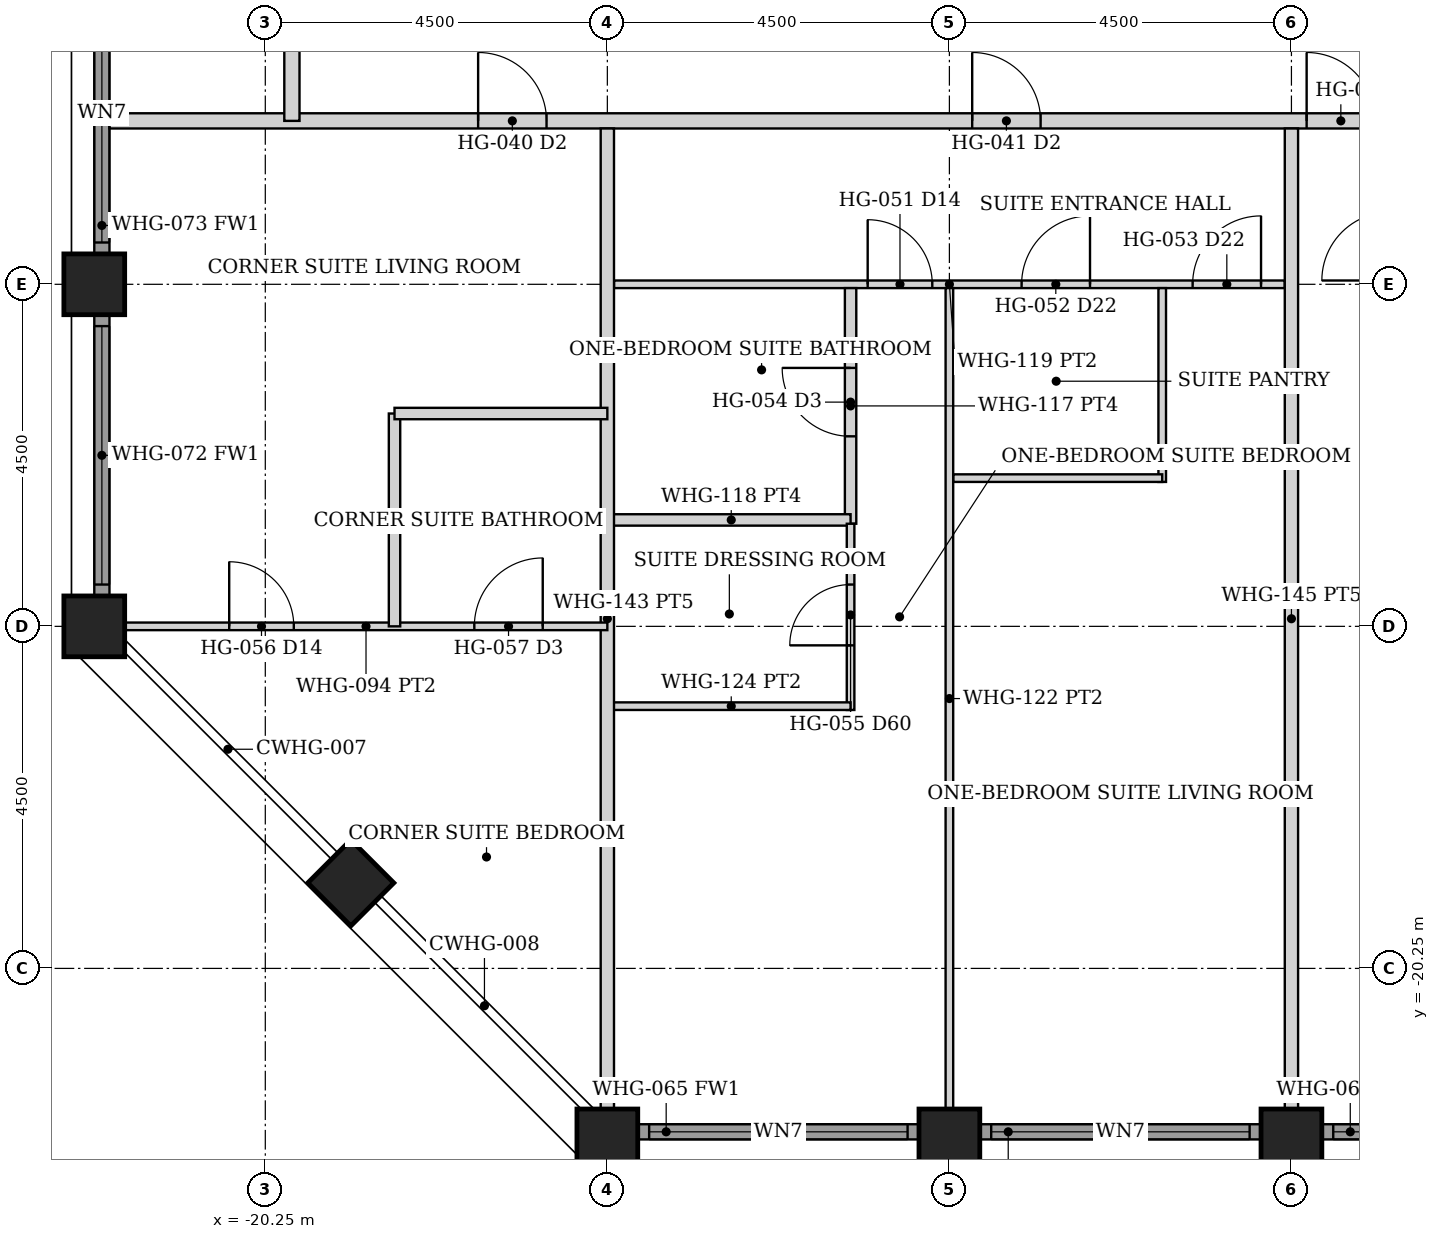
"""IFC4 building model, lengths in metres.
Left out: names, types, materials, properties, quantities, classifications, styles, units other than length and angle.
Written with IfcOpenShell. Run it as: python <this file> out.ifc"""

import sys

from ifc_helpers import new_model, si_unit, direction, frame, frame_2d, origin, origin_2d, place, context, subcontext, project, spatial, rectangle, hollow_rectangle, extrude, element, fill, save


model = new_model("IFC4")
c1 = context("Model", 3, precision=1e-05, world=origin(), true_north=direction((0.0, 1.0)))
c2 = subcontext(c1, "Body", "Model", "MODEL_VIEW")
j1 = project(units=[si_unit("LENGTHUNIT", "METRE"), si_unit("PLANEANGLEUNIT", "RADIAN")], contexts=[c1])
p1 = place(None, origin())
s1 = spatial("IfcSite", under=j1, at=p1, CompositionType="ELEMENT")
p2 = place(p1, origin())
s2 = spatial("IfcBuilding", under=s1, at=p2, CompositionType="ELEMENT")
p3 = place(p2, frame((0.0, 0.0, 186.8)))
s3 = spatial("IfcBuildingStorey", under=s2, at=p3, CompositionType="ELEMENT", Elevation=186.8)
for number, where, z_axis, x_axis in (
    (1, (-15.75, -22.5, 0.0), (0.0, 0.0, 1.0), (0.0, 1.0, 0.0)),
    (2, (-22.5, -15.75, 0.0), (0.0, 0.0, 1.0), (1.0, 0.0, 0.0)),
    (3, (-11.25, -22.5, 0.0), (0.0, 0.0, 1.0), (0.0, 1.0, 0.0)),
    (4, (-22.5, -11.25, 0.0), (0.0, 0.0, 1.0), (1.0, 0.0, 0.0)),
    (5, (-6.75, -22.5, 0.0), (0.0, 0.0, 1.0), (0.0, 1.0, 0.0)),
    (6, (-19.125, -19.125, 0.0), (0.0, 0.0, 1.0), (0.707, 0.707, 0.0)),
):
    element("IfcColumn", number, at=place(p3, frame(where, z_axis=z_axis, x_axis=x_axis)), inside=s3, PredefinedType="COLUMN", context=c2, shape_type="SweptSolid", body=[
        extrude(hollow_rectangle(XDim=0.8, YDim=0.8, WallThickness=0.045, at=origin_2d()), origin(), (0.0, 0.0, 1.0), 3.6),
    ])
p4 = place(p3, frame((-15.345, -22.4, 0.0), z_axis=(0.0, 0.0, 1.0), x_axis=(1.0, 0.0, 0.0)))
e7 = element("IfcWall", 7, at=p4, inside=s3, PredefinedType="SOLIDWALL", context=c2, shape_type="SweptSolid", body=[
    extrude(rectangle(XDim=3.69, YDim=0.2, at=frame_2d((1.845, 0.0))), origin(), (0.0, 0.0, 1.0), 2.379),
])
p5 = place(p4, frame((0.145, 0.0, 0.3)))
e8 = element("IfcOpeningElement", 8, at=p5, cuts=e7, PredefinedType="OPENING", context=c2, shape_type="SweptSolid", body=[
    extrude(rectangle(XDim=3.4, YDim=1.929, at=frame_2d((1.7, 0.964))), frame((0.0, 0.11, 0.0), z_axis=(0.0, -1.0, 0.0), x_axis=(1.0, 0.0, 0.0)), (0.0, 0.0, 1.0), 0.22),
])
p6 = place(p3, frame((-10.845, -22.4, 0.0), z_axis=(0.0, 0.0, 1.0), x_axis=(1.0, 0.0, 0.0)))
e9 = element("IfcWall", 9, at=p6, inside=s3, PredefinedType="SOLIDWALL", context=c2, shape_type="SweptSolid", body=[
    extrude(rectangle(XDim=3.69, YDim=0.2, at=frame_2d((1.845, 0.0))), origin(), (0.0, 0.0, 1.0), 2.379),
])
p7 = place(p6, frame((0.145, 0.0, 0.3)))
e10 = element("IfcOpeningElement", 10, at=p7, cuts=e9, PredefinedType="OPENING", context=c2, shape_type="SweptSolid", body=[
    extrude(rectangle(XDim=3.4, YDim=1.929, at=frame_2d((1.7, 0.964))), frame((0.0, 0.11, 0.0), z_axis=(0.0, -1.0, 0.0), x_axis=(1.0, 0.0, 0.0)), (0.0, 0.0, 1.0), 0.22),
])
p8 = place(p3, frame((-6.345, -22.4, 0.0), z_axis=(0.0, 0.0, 1.0), x_axis=(1.0, 0.0, 0.0)))
e11 = element("IfcWall", 11, at=p8, inside=s3, PredefinedType="SOLIDWALL", context=c2, shape_type="SweptSolid", body=[
    extrude(rectangle(XDim=3.69, YDim=0.2, at=frame_2d((1.845, 0.0))), origin(), (0.0, 0.0, 1.0), 2.379),
])
p9 = place(p8, frame((0.145, 0.0, 0.3)))
e12 = element("IfcOpeningElement", 12, at=p9, cuts=e11, PredefinedType="OPENING", context=c2, shape_type="SweptSolid", body=[
    extrude(rectangle(XDim=3.4, YDim=1.929, at=frame_2d((1.7, 0.964))), frame((0.0, 0.11, 0.0), z_axis=(0.0, -1.0, 0.0), x_axis=(1.0, 0.0, 0.0)), (0.0, 0.0, 1.0), 0.22),
])
p10 = place(p3, frame((-22.4, -15.345, 0.0), z_axis=(0.0, 0.0, 1.0), x_axis=(0.0, 1.0, 0.0)))
e13 = element("IfcWall", 13, at=p10, inside=s3, PredefinedType="SOLIDWALL", context=c2, shape_type="SweptSolid", body=[
    extrude(rectangle(XDim=3.69, YDim=0.2, at=frame_2d((1.845, 0.0))), origin(), (0.0, 0.0, 1.0), 2.379),
])
p11 = place(p10, frame((0.145, 0.0, 0.3)))
e14 = element("IfcOpeningElement", 14, at=p11, cuts=e13, PredefinedType="OPENING", context=c2, shape_type="SweptSolid", body=[
    extrude(rectangle(XDim=3.4, YDim=1.929, at=frame_2d((1.7, 0.964))), frame((0.0, 0.11, 0.0), z_axis=(0.0, -1.0, 0.0), x_axis=(1.0, 0.0, 0.0)), (0.0, 0.0, 1.0), 0.22),
])
p12 = place(p3, frame((-22.4, -10.845, 0.0), z_axis=(0.0, 0.0, 1.0), x_axis=(0.0, 1.0, 0.0)))
e15 = element("IfcWall", 15, at=p12, inside=s3, PredefinedType="SOLIDWALL", context=c2, shape_type="SweptSolid", body=[
    extrude(rectangle(XDim=3.69, YDim=0.2, at=frame_2d((1.845, 0.0))), origin(), (0.0, 0.0, 1.0), 2.379),
])
p13 = place(p12, frame((0.145, 0.0, 0.3)))
e16 = element("IfcOpeningElement", 16, at=p13, cuts=e15, PredefinedType="OPENING", context=c2, shape_type="SweptSolid", body=[
    extrude(rectangle(XDim=3.4, YDim=1.929, at=frame_2d((1.7, 0.964))), frame((0.0, 0.11, 0.0), z_axis=(0.0, -1.0, 0.0), x_axis=(1.0, 0.0, 0.0)), (0.0, 0.0, 1.0), 0.22),
])
p14 = place(p3, frame((-22.3, -9.1, 0.0), z_axis=(0.0, 0.0, 1.0), x_axis=(1.0, 0.0, 0.0)))
e17 = element("IfcWall", 17, at=p14, inside=s3, PredefinedType="PARTITIONING", context=c2, shape_type="SweptSolid", body=[
    extrude(rectangle(XDim=44.6, YDim=0.2, at=frame_2d((22.3, 0.0))), origin(), (0.0, 0.0, 1.0), 2.379),
])
p15 = place(p14, frame((11.35, 0.0, 0.0)))
e18 = element("IfcOpeningElement", 18, at=p15, cuts=e17, PredefinedType="OPENING", context=c2, shape_type="SweptSolid", body=[
    extrude(rectangle(XDim=0.9, YDim=2.1, at=frame_2d((0.45, 1.05))), frame((0.0, 0.11, 0.0), z_axis=(0.0, -1.0, 0.0), x_axis=(1.0, 0.0, 0.0)), (0.0, 0.0, 1.0), 0.22),
])
p16 = place(p14, frame((15.75, 0.0, 0.0)))
e19 = element("IfcOpeningElement", 19, at=p16, cuts=e17, PredefinedType="OPENING", context=c2, shape_type="SweptSolid", body=[
    extrude(rectangle(XDim=0.9, YDim=2.1, at=frame_2d((0.45, 1.05))), frame((0.0, 0.11, 0.0), z_axis=(0.0, -1.0, 0.0), x_axis=(1.0, 0.0, 0.0)), (0.0, 0.0, 1.0), 0.22),
])
p17 = place(p14, frame((23.45, 0.0, 0.0)))
e20 = element("IfcOpeningElement", 20, at=p17, cuts=e17, PredefinedType="OPENING", context=c2, shape_type="SweptSolid", body=[
    extrude(rectangle(XDim=0.9, YDim=2.1, at=frame_2d((0.45, 1.05))), frame((0.0, 0.11, 0.0), z_axis=(0.0, -1.0, 0.0), x_axis=(1.0, 0.0, 0.0)), (0.0, 0.0, 1.0), 0.22),
])
p18 = place(p14, frame((24.75, 0.0, 0.0)))
e21 = element("IfcOpeningElement", 21, at=p18, cuts=e17, PredefinedType="OPENING", context=c2, shape_type="SweptSolid", body=[
    extrude(rectangle(XDim=0.9, YDim=2.1, at=frame_2d((0.45, 1.05))), frame((0.0, 0.11, 0.0), z_axis=(0.0, -1.0, 0.0), x_axis=(1.0, 0.0, 0.0)), (0.0, 0.0, 1.0), 0.22),
])
p19 = place(p14, frame((29.25, 0.0, 0.0)))
e22 = element("IfcOpeningElement", 22, at=p19, cuts=e17, PredefinedType="OPENING", context=c2, shape_type="SweptSolid", body=[
    extrude(rectangle(XDim=0.9, YDim=2.1, at=frame_2d((0.45, 1.05))), frame((0.0, 0.11, 0.0), z_axis=(0.0, -1.0, 0.0), x_axis=(1.0, 0.0, 0.0)), (0.0, 0.0, 1.0), 0.22),
])
p20 = place(p14, frame((38.85, 0.0, 0.0)))
e23 = element("IfcOpeningElement", 23, at=p20, cuts=e17, PredefinedType="OPENING", context=c2, shape_type="SweptSolid", body=[
    extrude(rectangle(XDim=0.9, YDim=2.1, at=frame_2d((0.45, 1.05))), frame((0.0, 0.11, 0.0), z_axis=(0.0, -1.0, 0.0), x_axis=(1.0, 0.0, 0.0)), (0.0, 0.0, 1.0), 0.22),
])
p21 = place(p14, frame((4.85, 0.0, 0.0)))
e24 = element("IfcOpeningElement", 24, at=p21, cuts=e17, PredefinedType="OPENING", context=c2, shape_type="SweptSolid", body=[
    extrude(rectangle(XDim=0.9, YDim=2.1, at=frame_2d((0.45, 1.05))), frame((0.0, 0.11, 0.0), z_axis=(0.0, -1.0, 0.0), x_axis=(1.0, 0.0, 0.0)), (0.0, 0.0, 1.0), 0.22),
])
p22 = place(p3, frame((-19.9, -9.1, 0.0), z_axis=(0.0, 0.0, 1.0), x_axis=(0.0, 1.0, 0.0)))
e25 = element("IfcWall", 25, at=p22, inside=s3, PredefinedType="PARTITIONING", context=c2, shape_type="SweptSolid", body=[
    extrude(rectangle(XDim=18.2, YDim=0.2, at=frame_2d((9.1, 0.0))), origin(), (0.0, 0.0, 1.0), 2.379),
])
p23 = place(p22, frame((8.6, 0.0, 0.0)))
e26 = element("IfcOpeningElement", 26, at=p23, cuts=e25, PredefinedType="OPENING", context=c2, shape_type="SweptSolid", body=[
    extrude(rectangle(XDim=1.0, YDim=2.1, at=frame_2d((0.5, 1.05))), frame((0.0, 0.11, 0.0), z_axis=(0.0, -1.0, 0.0), x_axis=(1.0, 0.0, 0.0)), (0.0, 0.0, 1.0), 0.22),
])
p24 = place(p3, frame((-15.663, -11.25, 0.0), z_axis=(0.0, 0.0, 1.0), x_axis=(1.0, 0.0, 0.0)))
e27 = element("IfcWall", 27, at=p24, inside=s3, PredefinedType="PARTITIONING", context=c2, shape_type="SweptSolid", body=[
    extrude(rectangle(XDim=8.825, YDim=0.1, at=frame_2d((4.413, 0.0))), origin(), (0.0, 0.0, 1.0), 2.379),
])
p25 = place(p24, frame((5.363, 0.0, 0.0)))
e28 = element("IfcOpeningElement", 28, at=p25, cuts=e27, PredefinedType="OPENING", context=c2, shape_type="SweptSolid", body=[
    extrude(rectangle(XDim=0.9, YDim=2.1, at=frame_2d((0.45, 1.05))), frame((0.0, 0.06, 0.0), z_axis=(0.0, -1.0, 0.0), x_axis=(1.0, 0.0, 0.0)), (0.0, 0.0, 1.0), 0.12),
])
p26 = place(p24, frame((7.613, 0.0, 0.0)))
e29 = element("IfcOpeningElement", 29, at=p26, cuts=e27, PredefinedType="OPENING", context=c2, shape_type="SweptSolid", body=[
    extrude(rectangle(XDim=0.9, YDim=2.1, at=frame_2d((0.45, 1.05))), frame((0.0, 0.06, 0.0), z_axis=(0.0, -1.0, 0.0), x_axis=(1.0, 0.0, 0.0)), (0.0, 0.0, 1.0), 0.12),
])
p27 = place(p24, frame((3.337, 0.0, 0.0)))
e30 = element("IfcOpeningElement", 30, at=p27, cuts=e27, PredefinedType="OPENING", context=c2, shape_type="SweptSolid", body=[
    extrude(rectangle(XDim=0.85, YDim=2.1, at=frame_2d((0.425, 1.05))), frame((0.0, 0.06, 0.0), z_axis=(0.0, -1.0, 0.0), x_axis=(1.0, 0.0, 0.0)), (0.0, 0.0, 1.0), 0.12),
])
p28 = place(p3, frame((-8.45, -13.85, 0.0), z_axis=(0.0, 0.0, 1.0), x_axis=(0.0, 1.0, 0.0)))
e31 = element("IfcWall", 31, at=p28, inside=s3, PredefinedType="PARTITIONING", context=c2, shape_type="SweptSolid", body=[
    extrude(rectangle(XDim=2.55, YDim=0.1, at=frame_2d((1.275, 0.0))), origin(), (0.0, 0.0, 1.0), 2.379),
])
p29 = place(p3, frame((-11.2, -13.8, 0.0), z_axis=(0.0, 0.0, 1.0), x_axis=(1.0, 0.0, 0.0)))
e32 = element("IfcWall", 32, at=p29, inside=s3, PredefinedType="PARTITIONING", context=c2, shape_type="SweptSolid", body=[
    extrude(rectangle(XDim=2.75, YDim=0.1, at=frame_2d((1.375, 0.0))), origin(), (0.0, 0.0, 1.0), 2.379),
])
p30 = place(p3, frame((-11.25, -22.1, 0.0), z_axis=(0.0, 0.0, 1.0), x_axis=(0.0, 1.0, 0.0)))
e33 = element("IfcWall", 33, at=p30, inside=s3, PredefinedType="PARTITIONING", context=c2, shape_type="SweptSolid", body=[
    extrude(rectangle(XDim=10.8, YDim=0.1, at=frame_2d((5.4, 0.0))), origin(), (0.0, 0.0, 1.0), 2.379),
])
p31 = place(p3, frame((-12.55, -14.4, 0.0), z_axis=(0.0, 0.0, 1.0), x_axis=(0.0, 1.0, 0.0)))
e34 = element("IfcWall", 34, at=p31, inside=s3, PredefinedType="PARTITIONING", context=c2, shape_type="SweptSolid", body=[
    extrude(rectangle(XDim=3.1, YDim=0.15, at=frame_2d((1.55, 0.0))), origin(), (0.0, 0.0, 1.0), 2.379),
])
p32 = place(p31, frame((1.15, 0.0, 0.0)))
e35 = element("IfcOpeningElement", 35, at=p32, cuts=e34, PredefinedType="OPENING", context=c2, shape_type="SweptSolid", body=[
    extrude(rectangle(XDim=0.9, YDim=2.1, at=frame_2d((0.45, 1.05))), frame((0.0, 0.085, 0.0), z_axis=(0.0, -1.0, 0.0), x_axis=(1.0, 0.0, 0.0)), (0.0, 0.0, 1.0), 0.17),
])
p33 = place(p3, frame((-15.69, -14.35, 0.0), z_axis=(0.0, 0.0, 1.0), x_axis=(1.0, 0.0, 0.0)))
e36 = element("IfcWall", 36, at=p33, inside=s3, PredefinedType="PARTITIONING", context=c2, shape_type="SweptSolid", body=[
    extrude(rectangle(XDim=3.14, YDim=0.15, at=frame_2d((1.57, 0.0))), origin(), (0.0, 0.0, 1.0), 2.379),
])
p34 = place(p3, frame((-12.55, -16.85, 0.0), z_axis=(0.0, 0.0, 1.0), x_axis=(0.0, 1.0, 0.0)))
e37 = element("IfcWall", 37, at=p34, inside=s3, PredefinedType="PARTITIONING", context=c2, shape_type="SweptSolid", body=[
    extrude(rectangle(XDim=2.45, YDim=0.1, at=frame_2d((1.225, 0.0))), origin(), (0.0, 0.0, 1.0), 2.379),
])
p35 = place(p34, frame((0.85, 0.0, 0.0)))
e38 = element("IfcOpeningElement", 38, at=p35, cuts=e37, PredefinedType="OPENING", context=c2, shape_type="SweptSolid", body=[
    extrude(rectangle(XDim=0.8, YDim=2.1, at=frame_2d((0.4, 1.05))), frame((0.0, 0.06, 0.0), z_axis=(0.0, -1.0, 0.0), x_axis=(1.0, 0.0, 0.0)), (0.0, 0.0, 1.0), 0.12),
])
p36 = place(p3, frame((-15.69, -16.8, 0.0), z_axis=(0.0, 0.0, 1.0), x_axis=(1.0, 0.0, 0.0)))
e39 = element("IfcWall", 39, at=p36, inside=s3, PredefinedType="PARTITIONING", context=c2, shape_type="SweptSolid", body=[
    extrude(rectangle(XDim=3.14, YDim=0.1, at=frame_2d((1.57, 0.0))), origin(), (0.0, 0.0, 1.0), 2.379),
])
for number, where, z_axis, x_axis in (
    (40, (-15.75, -22.1, 0.0), (0.0, 0.0, 1.0), (0.0, 1.0, 0.0)),
    (41, (-6.75, -22.1, 0.0), (0.0, 0.0, 1.0), (0.0, 1.0, 0.0)),
):
    element("IfcWall", number, at=place(p3, frame(where, z_axis=z_axis, x_axis=x_axis)), inside=s3, PredefinedType="PARTITIONING", context=c2, shape_type="SweptSolid", body=[
        extrude(rectangle(XDim=12.9, YDim=0.175, at=frame_2d((6.45, 0.0))), origin(), (0.0, 0.0, 1.0), 2.379),
    ])
p37 = place(p3, frame((-22.1, -15.75, 0.0), z_axis=(0.0, 0.0, 1.0), x_axis=(1.0, 0.0, 0.0)))
e42 = element("IfcWall", 42, at=p37, inside=s3, PredefinedType="PARTITIONING", context=c2, shape_type="SweptSolid", body=[
    extrude(rectangle(XDim=6.35, YDim=0.1, at=frame_2d((3.175, 0.0))), origin(), (0.0, 0.0, 1.0), 2.379),
])
p38 = place(p37, frame((1.375, 0.0, 0.0)))
e43 = element("IfcOpeningElement", 43, at=p38, cuts=e42, PredefinedType="OPENING", context=c2, shape_type="SweptSolid", body=[
    extrude(rectangle(XDim=0.85, YDim=2.1, at=frame_2d((0.425, 1.05))), frame((0.0, 0.06, 0.0), z_axis=(0.0, -1.0, 0.0), x_axis=(1.0, 0.0, 0.0)), (0.0, 0.0, 1.0), 0.12),
])
p39 = place(p37, frame((4.6, 0.0, 0.0)))
e44 = element("IfcOpeningElement", 44, at=p39, cuts=e42, PredefinedType="OPENING", context=c2, shape_type="SweptSolid", body=[
    extrude(rectangle(XDim=0.9, YDim=2.1, at=frame_2d((0.45, 1.05))), frame((0.0, 0.06, 0.0), z_axis=(0.0, -1.0, 0.0), x_axis=(1.0, 0.0, 0.0)), (0.0, 0.0, 1.0), 0.12),
])
for number, where, z_axis, x_axis in (
    (45, (-18.55, -15.75, 0.0), (0.0, 0.0, 1.0), (0.0, 1.0, 0.0)),
    (46, (-18.55, -12.95, 0.0), (0.0, 0.0, 1.0), (1.0, 0.0, 0.0)),
):
    element("IfcWall", number, at=place(p3, frame(where, z_axis=z_axis, x_axis=x_axis)), inside=s3, PredefinedType="PARTITIONING", context=c2, shape_type="SweptSolid", body=[
        extrude(rectangle(XDim=2.8, YDim=0.15, at=frame_2d((1.4, 0.0))), origin(), (0.0, 0.0, 1.0), 2.379),
    ])
p40 = place(p5, origin())
e47 = element("IfcWindow", 47, at=p40, inside=s3, PartitioningType="SINGLE_PANEL", PredefinedType="WINDOW", context=c2, shape_type="SweptSolid", body=[
    extrude(rectangle(XDim=3.4, YDim=1.929, at=frame_2d((1.7, 0.964))), frame((0.0, 0.03, 0.0), z_axis=(0.0, -1.0, 0.0), x_axis=(1.0, 0.0, 0.0)), (0.0, 0.0, 1.0), 0.06),
])
fill(e8, e47)
p41 = place(p7, origin())
e48 = element("IfcWindow", 48, at=p41, inside=s3, PartitioningType="SINGLE_PANEL", PredefinedType="WINDOW", context=c2, shape_type="SweptSolid", body=[
    extrude(rectangle(XDim=3.4, YDim=1.929, at=frame_2d((1.7, 0.964))), frame((0.0, 0.03, 0.0), z_axis=(0.0, -1.0, 0.0), x_axis=(1.0, 0.0, 0.0)), (0.0, 0.0, 1.0), 0.06),
])
fill(e10, e48)
p42 = place(p9, origin())
e49 = element("IfcWindow", 49, at=p42, inside=s3, PartitioningType="SINGLE_PANEL", PredefinedType="WINDOW", context=c2, shape_type="SweptSolid", body=[
    extrude(rectangle(XDim=3.4, YDim=1.929, at=frame_2d((1.7, 0.964))), frame((0.0, 0.03, 0.0), z_axis=(0.0, -1.0, 0.0), x_axis=(1.0, 0.0, 0.0)), (0.0, 0.0, 1.0), 0.06),
])
fill(e12, e49)
p43 = place(p11, origin())
e50 = element("IfcWindow", 50, at=p43, inside=s3, PartitioningType="SINGLE_PANEL", PredefinedType="WINDOW", context=c2, shape_type="SweptSolid", body=[
    extrude(rectangle(XDim=3.4, YDim=1.929, at=frame_2d((1.7, 0.964))), frame((0.0, 0.03, 0.0), z_axis=(0.0, -1.0, 0.0), x_axis=(1.0, 0.0, 0.0)), (0.0, 0.0, 1.0), 0.06),
])
fill(e14, e50)
p44 = place(p13, origin())
e51 = element("IfcWindow", 51, at=p44, inside=s3, PartitioningType="SINGLE_PANEL", PredefinedType="WINDOW", context=c2, shape_type="SweptSolid", body=[
    extrude(rectangle(XDim=3.4, YDim=1.929, at=frame_2d((1.7, 0.964))), frame((0.0, 0.03, 0.0), z_axis=(0.0, -1.0, 0.0), x_axis=(1.0, 0.0, 0.0)), (0.0, 0.0, 1.0), 0.06),
])
fill(e16, e51)
p45 = place(p15, origin())
e52 = element("IfcDoor", 52, at=p45, inside=s3, OperationType="SINGLE_SWING_LEFT", PredefinedType="DOOR", context=c2, shape_type="SweptSolid", body=[
    extrude(rectangle(XDim=0.9, YDim=2.1, at=frame_2d((0.45, 1.05))), frame((0.0, 0.025, 0.0), z_axis=(0.0, -1.0, 0.0), x_axis=(1.0, 0.0, 0.0)), (0.0, 0.0, 1.0), 0.05),
])
fill(e18, e52)
p46 = place(p25, origin())
e53 = element("IfcDoor", 53, at=p46, inside=s3, OperationType="SINGLE_SWING_RIGHT", PredefinedType="DOOR", context=c2, shape_type="SweptSolid", body=[
    extrude(rectangle(XDim=0.9, YDim=2.1, at=frame_2d((0.45, 1.05))), frame((0.0, 0.025, 0.0), z_axis=(0.0, -1.0, 0.0), x_axis=(1.0, 0.0, 0.0)), (0.0, 0.0, 1.0), 0.05),
])
fill(e28, e53)
p47 = place(p26, origin())
e54 = element("IfcDoor", 54, at=p47, inside=s3, OperationType="SINGLE_SWING_RIGHT", PredefinedType="DOOR", context=c2, shape_type="SweptSolid", body=[
    extrude(rectangle(XDim=0.9, YDim=2.1, at=frame_2d((0.45, 1.05))), frame((0.0, 0.025, 0.0), z_axis=(0.0, -1.0, 0.0), x_axis=(1.0, 0.0, 0.0)), (0.0, 0.0, 1.0), 0.05),
])
fill(e29, e54)
p48 = place(p27, origin())
e55 = element("IfcDoor", 55, at=p48, inside=s3, OperationType="SINGLE_SWING_LEFT", PredefinedType="DOOR", context=c2, shape_type="SweptSolid", body=[
    extrude(rectangle(XDim=0.85, YDim=2.1, at=frame_2d((0.425, 1.05))), frame((0.0, 0.025, 0.0), z_axis=(0.0, -1.0, 0.0), x_axis=(1.0, 0.0, 0.0)), (0.0, 0.0, 1.0), 0.05),
])
fill(e30, e55)
p49 = place(p32, origin())
e56 = element("IfcDoor", 56, at=p49, inside=s3, OperationType="SINGLE_SWING_RIGHT", PredefinedType="DOOR", context=c2, shape_type="SweptSolid", body=[
    extrude(rectangle(XDim=0.9, YDim=2.1, at=frame_2d((0.45, 1.05))), frame((0.0, 0.025, 0.0), z_axis=(0.0, -1.0, 0.0), x_axis=(1.0, 0.0, 0.0)), (0.0, 0.0, 1.0), 0.05),
])
fill(e35, e56)
p50 = place(p35, origin())
e57 = element("IfcDoor", 57, at=p50, inside=s3, OperationType="SINGLE_SWING_LEFT", PredefinedType="DOOR", context=c2, shape_type="SweptSolid", body=[
    extrude(rectangle(XDim=0.8, YDim=2.1, at=frame_2d((0.4, 1.05))), frame((0.0, 0.025, 0.0), z_axis=(0.0, -1.0, 0.0), x_axis=(1.0, 0.0, 0.0)), (0.0, 0.0, 1.0), 0.05),
])
fill(e38, e57)
p51 = place(p16, origin())
e58 = element("IfcDoor", 58, at=p51, inside=s3, OperationType="SINGLE_SWING_LEFT", PredefinedType="DOOR", context=c2, shape_type="SweptSolid", body=[
    extrude(rectangle(XDim=0.9, YDim=2.1, at=frame_2d((0.45, 1.05))), frame((0.0, 0.025, 0.0), z_axis=(0.0, -1.0, 0.0), x_axis=(1.0, 0.0, 0.0)), (0.0, 0.0, 1.0), 0.05),
])
fill(e19, e58)
p52 = place(p21, origin())
e59 = element("IfcDoor", 59, at=p52, inside=s3, OperationType="SINGLE_SWING_LEFT", PredefinedType="DOOR", context=c2, shape_type="SweptSolid", body=[
    extrude(rectangle(XDim=0.9, YDim=2.1, at=frame_2d((0.45, 1.05))), frame((0.0, 0.025, 0.0), z_axis=(0.0, -1.0, 0.0), x_axis=(1.0, 0.0, 0.0)), (0.0, 0.0, 1.0), 0.05),
])
fill(e24, e59)
p53 = place(p38, origin())
e60 = element("IfcDoor", 60, at=p53, inside=s3, OperationType="SINGLE_SWING_LEFT", PredefinedType="DOOR", context=c2, shape_type="SweptSolid", body=[
    extrude(rectangle(XDim=0.85, YDim=2.1, at=frame_2d((0.425, 1.05))), frame((0.0, 0.025, 0.0), z_axis=(0.0, -1.0, 0.0), x_axis=(1.0, 0.0, 0.0)), (0.0, 0.0, 1.0), 0.05),
])
fill(e43, e60)
p54 = place(p39, origin())
e61 = element("IfcDoor", 61, at=p54, inside=s3, OperationType="SINGLE_SWING_RIGHT", PredefinedType="DOOR", context=c2, shape_type="SweptSolid", body=[
    extrude(rectangle(XDim=0.9, YDim=2.1, at=frame_2d((0.45, 1.05))), frame((0.0, 0.025, 0.0), z_axis=(0.0, -1.0, 0.0), x_axis=(1.0, 0.0, 0.0)), (0.0, 0.0, 1.0), 0.05),
])
fill(e44, e61)
save(model, sys.argv[1])
